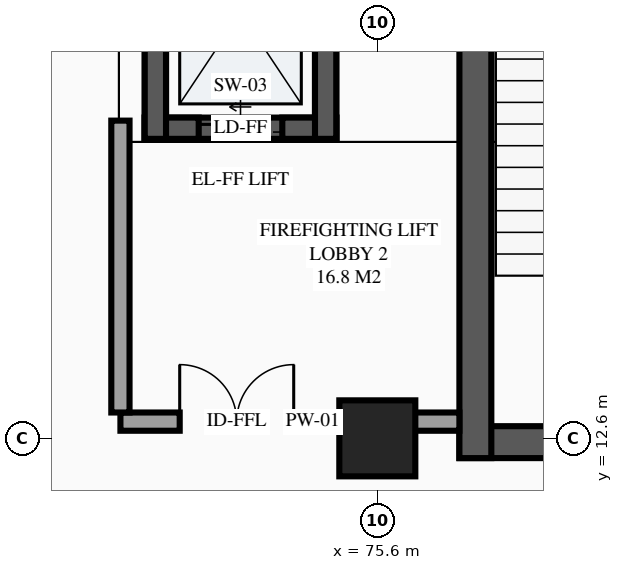
"""IFC4 building model, lengths in metres.
Left out: names, types, materials, properties, quantities, classifications, styles, units other than length and angle.
Written with IfcOpenShell. Run it as: python <this file> out.ifc"""

import sys

from ifc_helpers import new_model, si_unit, direction, frame, frame_2d, origin, origin_2d, place, context, subcontext, project, spatial, rectangle, extrude, element, fill, save


model = new_model("IFC4")
c1 = context("Model", 3, precision=1e-05, world=origin(), true_north=direction((0.0, 1.0)))
c2 = subcontext(c1, "Body", "Model", "MODEL_VIEW")
j1 = project(units=[si_unit("LENGTHUNIT", "METRE"), si_unit("PLANEANGLEUNIT", "RADIAN")], contexts=[c1])
p1 = place(None, origin())
s1 = spatial("IfcSite", under=j1, at=p1, CompositionType="ELEMENT")
p2 = place(p1, origin())
s2 = spatial("IfcBuilding", under=s1, at=p2, CompositionType="ELEMENT")
p3 = place(p2, frame((0.0, 0.0, -4.5)))
s3 = spatial("IfcBuildingStorey", under=s2, at=p3, CompositionType="ELEMENT", Elevation=-4.5)
p4 = place(p3, frame((75.6, 12.6, -0.36), z_axis=(0.0, 0.0, 1.0), x_axis=(1.0, 0.0, 0.0)))
e1 = element("IfcColumn", 1, at=p4, inside=s3, PredefinedType="COLUMN", context=c2, shape_type="SweptSolid", body=[
    extrude(rectangle(XDim=1.0, YDim=1.0, at=origin_2d()), origin(), (0.0, 0.0, 1.0), 4.86),
])
p5 = place(p3, frame((72.54, 16.68, -1.5), z_axis=(0.0, 0.0, 1.0), x_axis=(1.0, 0.0, 0.0)))
e2 = element("IfcWall", 2, at=p5, inside=s3, PredefinedType="SHEAR", context=c2, shape_type="SweptSolid", body=[
    extrude(rectangle(XDim=2.52, YDim=0.28, at=frame_2d((1.26, 0.0))), origin(), (0.0, 0.0, 1.0), 1.5),
])
for number, where, z_axis, x_axis in (
    (3, (74.92, 16.54, -1.5), (0.0, 0.0, 1.0), (0.0, 1.0, 0.0)),
    (4, (72.68, 19.86, -1.5), (0.0, 0.0, 1.0), (0.0, -1.0, 0.0)),
):
    element("IfcWall", number, at=place(p3, frame(where, z_axis=z_axis, x_axis=x_axis)), inside=s3, PredefinedType="SHEAR", context=c2, shape_type="SweptSolid", body=[
        extrude(rectangle(XDim=3.32, YDim=0.28, at=frame_2d((1.66, 0.0))), origin(), (0.0, 0.0, 1.0), 1.5),
    ])
p6 = place(p3, frame((72.54, 16.68, 0.0), z_axis=(0.0, 0.0, 1.0), x_axis=(1.0, 0.0, 0.0)))
e5 = element("IfcWall", 5, at=p6, inside=s3, PredefinedType="SHEAR", context=c2, shape_type="SweptSolid", body=[
    extrude(rectangle(XDim=2.52, YDim=0.28, at=frame_2d((1.26, 0.0))), origin(), (0.0, 0.0, 1.0), 4.5),
])
p7 = place(p6, frame((0.71, 0.0, 0.0)))
e6 = element("IfcOpeningElement", 6, at=p7, cuts=e5, PredefinedType="OPENING", context=c2, shape_type="SweptSolid", body=[
    extrude(rectangle(XDim=1.1, YDim=2.2, at=frame_2d((0.55, 1.1))), frame((0.0, 0.15, 0.0), z_axis=(0.0, -1.0, 0.0), x_axis=(1.0, 0.0, 0.0)), (0.0, 0.0, 1.0), 0.3),
])
for number, where, z_axis, x_axis in (
    (7, (74.92, 16.54, 0.0), (0.0, 0.0, 1.0), (0.0, 1.0, 0.0)),
    (8, (72.68, 19.86, 0.0), (0.0, 0.0, 1.0), (0.0, -1.0, 0.0)),
):
    element("IfcWall", number, at=place(p3, frame(where, z_axis=z_axis, x_axis=x_axis)), inside=s3, PredefinedType="SHEAR", context=c2, shape_type="SweptSolid", body=[
        extrude(rectangle(XDim=3.32, YDim=0.28, at=frame_2d((1.66, 0.0))), origin(), (0.0, 0.0, 1.0), 4.5),
    ])
p8 = place(p3, frame((76.68, 12.55, 0.0), z_axis=(0.0, 0.0, 1.0), x_axis=(1.0, 0.0, 0.0)))
e9 = element("IfcWall", 9, at=p8, inside=s3, PredefinedType="SHEAR", context=c2, shape_type="SweptSolid", body=[
    extrude(rectangle(XDim=5.44, YDim=0.42, at=frame_2d((2.72, 0.0))), origin(), (0.0, 0.0, 1.0), 4.5),
])
p9 = place(p8, frame((2.145, 0.0, 0.0)))
e10 = element("IfcOpeningElement", 10, at=p9, cuts=e9, PredefinedType="OPENING", context=c2, shape_type="SweptSolid", body=[
    extrude(rectangle(XDim=1.15, YDim=2.15, at=frame_2d((0.575, 1.075))), frame((0.0, 0.22, 0.0), z_axis=(0.0, -1.0, 0.0), x_axis=(1.0, 0.0, 0.0)), (0.0, 0.0, 1.0), 0.44),
])
p10 = place(p3, frame((76.89, 21.42, 0.0), z_axis=(0.0, 0.0, 1.0), x_axis=(0.0, -1.0, 0.0)))
e11 = element("IfcWall", 11, at=p10, inside=s3, PredefinedType="SHEAR", context=c2, shape_type="SweptSolid", body=[
    extrude(rectangle(XDim=9.08, YDim=0.42, at=frame_2d((4.54, 0.0))), origin(), (0.0, 0.0, 1.0), 4.5),
])
p11 = place(p3, frame((72.22, 12.82, 0.0), z_axis=(0.0, 0.0, 1.0), x_axis=(1.0, 0.0, 0.0)))
e12 = element("IfcWall", 12, at=p11, inside=s3, PredefinedType="PARTITIONING", context=c2, shape_type="SweptSolid", body=[
    extrude(rectangle(XDim=4.46, YDim=0.24, at=frame_2d((2.23, 0.0))), origin(), (0.0, 0.0, 1.0), 3.33),
])
p12 = place(p11, frame((0.78, 0.0, 0.0)))
e13 = element("IfcOpeningElement", 13, at=p12, cuts=e12, PredefinedType="OPENING", context=c2, shape_type="SweptSolid", body=[
    extrude(rectangle(XDim=1.5, YDim=2.15, at=frame_2d((0.75, 1.075))), frame((0.0, 0.13, 0.0), z_axis=(0.0, -1.0, 0.0), x_axis=(1.0, 0.0, 0.0)), (0.0, 0.0, 1.0), 0.26),
])
p13 = place(p3, frame((72.22, 12.94, 0.0), z_axis=(0.0, 0.0, 1.0), x_axis=(0.0, 1.0, 0.0)))
e14 = element("IfcWall", 14, at=p13, inside=s3, PredefinedType="PARTITIONING", context=c2, shape_type="SweptSolid", body=[
    extrude(rectangle(XDim=3.84, YDim=0.24, at=frame_2d((1.92, 0.0))), origin(), (0.0, 0.0, 1.0), 4.175),
])
p14 = place(p7, origin())
e15 = element("IfcDoor", 15, at=p14, inside=s3, OperationType="SLIDING_TO_LEFT", PredefinedType="DOOR", context=c2, shape_type="SweptSolid", body=[
    extrude(rectangle(XDim=1.1, YDim=2.2, at=frame_2d((0.55, 1.1))), frame((0.0, 0.025, 0.0), z_axis=(0.0, -1.0, 0.0), x_axis=(1.0, 0.0, 0.0)), (0.0, 0.0, 1.0), 0.05),
])
fill(e6, e15)
p15 = place(p12, origin())
e16 = element("IfcDoor", 16, at=p15, inside=s3, OperationType="DOUBLE_DOOR_SINGLE_SWING", PredefinedType="DOOR", context=c2, shape_type="SweptSolid", body=[
    extrude(rectangle(XDim=1.5, YDim=2.15, at=frame_2d((0.75, 1.075))), frame((0.0, 0.025, 0.0), z_axis=(0.0, -1.0, 0.0), x_axis=(1.0, 0.0, 0.0)), (0.0, 0.0, 1.0), 0.05),
])
fill(e13, e16)
save(model, sys.argv[1])
